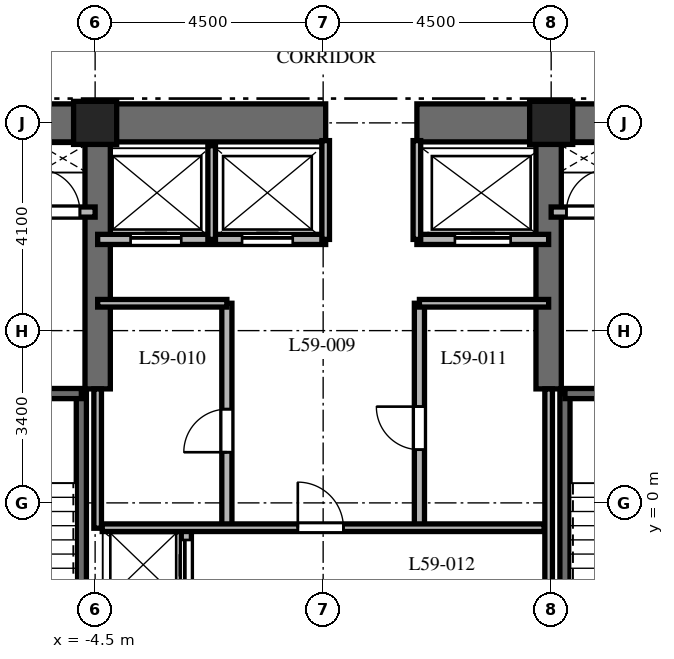
"""IFC4 building model, lengths in metres.
Left out: names, types, materials, properties, quantities, classifications, styles, units other than length and angle.
Written with IfcOpenShell. Run it as: python <this file> out.ifc"""

import sys

from ifc_helpers import new_model, si_unit, direction, frame, frame_2d, origin, origin_2d, place, context, subcontext, project, spatial, rectangle, extrude, element, fill, save


model = new_model("IFC4")
c1 = context("Model", 3, precision=1e-05, world=origin(), true_north=direction((0.0, 1.0)))
c2 = subcontext(c1, "Body", "Model", "MODEL_VIEW")
j1 = project(units=[si_unit("LENGTHUNIT", "METRE"), si_unit("PLANEANGLEUNIT", "RADIAN")], contexts=[c1])
p1 = place(None, origin())
s1 = spatial("IfcSite", under=j1, at=p1, CompositionType="ELEMENT")
p2 = place(p1, origin())
s2 = spatial("IfcBuilding", under=s1, at=p2, CompositionType="ELEMENT")
p3 = place(p2, frame((0.0, 0.0, 236.9)))
s3 = spatial("IfcBuildingStorey", under=s2, at=p3, CompositionType="ELEMENT", Elevation=236.9)
p4 = place(p3, frame((-9.375, 7.5, 0.0), z_axis=(0.0, 0.0, 1.0), x_axis=(1.0, 0.0, 0.0)))
e1 = element("IfcWall", 1, at=p4, inside=s3, PredefinedType="SHEAR", context=c2, shape_type="SweptSolid", body=[
    extrude(rectangle(XDim=9.425, YDim=0.75, at=frame_2d((4.712, 0.0))), origin(), (0.0, 0.0, 1.0), 3.8),
])
p5 = place(p3, frame((1.85, 7.5, 0.0), z_axis=(0.0, 0.0, 1.0), x_axis=(1.0, 0.0, 0.0)))
e2 = element("IfcWall", 2, at=p5, inside=s3, PredefinedType="SHEAR", context=c2, shape_type="SweptSolid", body=[
    extrude(rectangle(XDim=7.525, YDim=0.75, at=frame_2d((3.762, 0.0))), origin(), (0.0, 0.0, 1.0), 3.8),
])
for number, where, z_axis, x_axis in (
    (3, (-4.45, 2.25, 0.0), (0.0, 0.0, 1.0), (0.0, 1.0, 0.0)),
    (4, (4.45, 2.25, 0.0), (0.0, 0.0, 1.0), (0.0, 1.0, 0.0)),
):
    element("IfcWall", number, at=place(p3, frame(where, z_axis=z_axis, x_axis=x_axis)), inside=s3, PredefinedType="SHEAR", context=c2, shape_type="SweptSolid", body=[
        extrude(rectangle(XDim=4.875, YDim=0.5, at=frame_2d((2.438, 0.0))), origin(), (0.0, 0.0, 1.0), 3.8),
    ])
p6 = place(p3, frame((-4.772, -6.985, 0.0), z_axis=(0.0, 0.0, 1.0), x_axis=(0.0, 1.0, 0.0)))
e5 = element("IfcWall", 5, at=p6, inside=s3, PredefinedType="SHEAR", context=c2, shape_type="SweptSolid", body=[
    extrude(rectangle(XDim=9.143, YDim=0.2, at=frame_2d((4.572, 0.0))), origin(), (0.0, 0.0, 1.0), 3.8),
])
p7 = place(p3, frame((-8.458, 2.158, 0.0), z_axis=(0.0, 0.0, 1.0), x_axis=(1.0, 0.0, 0.0)))
e6 = element("IfcWall", 6, at=p7, inside=s3, PredefinedType="SHEAR", context=c2, shape_type="SweptSolid", body=[
    extrude(rectangle(XDim=3.686, YDim=0.2, at=frame_2d((1.843, 0.0))), origin(), (0.0, 0.0, 1.0), 3.8),
])
p8 = place(p7, frame((1.3, 0.0, 0.0)))
e7 = element("IfcOpeningElement", 7, at=p8, cuts=e6, PredefinedType="OPENING", context=c2, shape_type="SweptSolid", body=[
    extrude(rectangle(XDim=1.0, YDim=2.15, at=frame_2d((0.5, 1.075))), frame((0.0, 0.11, 0.0), z_axis=(0.0, -1.0, 0.0), x_axis=(1.0, 0.0, 0.0)), (0.0, 0.0, 1.0), 0.22),
])
p9 = place(p3, frame((4.772, -6.985, 0.0), z_axis=(0.0, 0.0, 1.0), x_axis=(0.0, 1.0, 0.0)))
e8 = element("IfcWall", 8, at=p9, inside=s3, PredefinedType="SHEAR", context=c2, shape_type="SweptSolid", body=[
    extrude(rectangle(XDim=9.143, YDim=0.2, at=frame_2d((4.572, 0.0))), origin(), (0.0, 0.0, 1.0), 3.8),
])
p10 = place(p3, frame((4.772, 2.158, 0.0), z_axis=(0.0, 0.0, 1.0), x_axis=(1.0, 0.0, 0.0)))
e9 = element("IfcWall", 9, at=p10, inside=s3, PredefinedType="SHEAR", context=c2, shape_type="SweptSolid", body=[
    extrude(rectangle(XDim=3.686, YDim=0.2, at=frame_2d((1.843, 0.0))), origin(), (0.0, 0.0, 1.0), 3.8),
])
p11 = place(p10, frame((1.35, 0.0, 0.0)))
e10 = element("IfcOpeningElement", 10, at=p11, cuts=e9, PredefinedType="OPENING", context=c2, shape_type="SweptSolid", body=[
    extrude(rectangle(XDim=1.0, YDim=2.15, at=frame_2d((0.5, 1.075))), frame((0.0, 0.11, 0.0), z_axis=(0.0, -1.0, 0.0), x_axis=(1.0, 0.0, 0.0)), (0.0, 0.0, 1.0), 0.22),
])
for number, where, z_axis, x_axis in (
    (11, (4.5, 7.5, 0.0), (0.0, 0.0, 1.0), (1.0, 0.0, 0.0)),
    (12, (-4.5, 7.5, 0.0), (0.0, 0.0, 1.0), (1.0, 0.0, 0.0)),
):
    element("IfcColumn", number, at=place(p3, frame(where, z_axis=z_axis, x_axis=x_axis)), inside=s3, PredefinedType="COLUMN", context=c2, shape_type="SweptSolid", body=[
        extrude(rectangle(XDim=0.85, YDim=0.85, at=origin_2d()), origin(), (0.0, 0.0, 1.0), 3.8),
    ])
p12 = place(p3, frame((-8.55, 5.74, 0.0), z_axis=(0.0, 0.0, 1.0), x_axis=(1.0, 0.0, 0.0)))
e13 = element("IfcWall", 13, at=p12, inside=s3, PredefinedType="PARTITIONING", context=c2, shape_type="SweptSolid", body=[
    extrude(rectangle(XDim=4.05, YDim=0.2, at=frame_2d((2.025, 0.0))), origin(), (0.0, 0.0, 1.0), 3.5),
])
p13 = place(p12, frame((0.75, 0.0, 0.0)))
e14 = element("IfcOpeningElement", 14, at=p13, cuts=e13, PredefinedType="OPENING", context=c2, shape_type="SweptSolid", body=[
    extrude(rectangle(XDim=1.1, YDim=2.2, at=frame_2d((0.55, 1.1))), frame((0.0, 0.11, 0.0), z_axis=(0.0, -1.0, 0.0), x_axis=(1.0, 0.0, 0.0)), (0.0, 0.0, 1.0), 0.22),
])
p14 = place(p12, frame((2.9, 0.0, 0.0)))
e15 = element("IfcOpeningElement", 15, at=p14, cuts=e13, PredefinedType="OPENING", context=c2, shape_type="SweptSolid", body=[
    extrude(rectangle(XDim=0.85, YDim=2.03, at=frame_2d((0.425, 1.015))), frame((0.0, 0.11, 0.0), z_axis=(0.0, -1.0, 0.0), x_axis=(1.0, 0.0, 0.0)), (0.0, 0.0, 1.0), 0.22),
])
p15 = place(p3, frame((4.5, 5.74, 0.0), z_axis=(0.0, 0.0, 1.0), x_axis=(1.0, 0.0, 0.0)))
e16 = element("IfcWall", 16, at=p15, inside=s3, PredefinedType="PARTITIONING", context=c2, shape_type="SweptSolid", body=[
    extrude(rectangle(XDim=4.05, YDim=0.2, at=frame_2d((2.025, 0.0))), origin(), (0.0, 0.0, 1.0), 3.5),
])
p16 = place(p15, frame((0.3, 0.0, 0.0)))
e17 = element("IfcOpeningElement", 17, at=p16, cuts=e16, PredefinedType="OPENING", context=c2, shape_type="SweptSolid", body=[
    extrude(rectangle(XDim=0.85, YDim=2.03, at=frame_2d((0.425, 1.015))), frame((0.0, 0.11, 0.0), z_axis=(0.0, -1.0, 0.0), x_axis=(1.0, 0.0, 0.0)), (0.0, 0.0, 1.0), 0.22),
])
p17 = place(p15, frame((2.15, 0.0, 0.0)))
e18 = element("IfcOpeningElement", 18, at=p17, cuts=e16, PredefinedType="OPENING", context=c2, shape_type="SweptSolid", body=[
    extrude(rectangle(XDim=1.1, YDim=2.2, at=frame_2d((0.55, 1.1))), frame((0.0, 0.11, 0.0), z_axis=(0.0, -1.0, 0.0), x_axis=(1.0, 0.0, 0.0)), (0.0, 0.0, 1.0), 0.22),
])
p18 = place(p3, frame((-2.7, -1.972, 0.0), z_axis=(0.0, 0.0, 1.0), x_axis=(0.0, 1.0, 0.0)))
e19 = element("IfcWall", 19, at=p18, inside=s3, PredefinedType="PARTITIONING", context=c2, shape_type="SweptSolid", body=[
    extrude(rectangle(XDim=1.472, YDim=0.2, at=frame_2d((0.736, 0.0))), origin(), (0.0, 0.0, 1.0), 3.5),
])
p19 = place(p18, frame((0.24, 0.0, 0.0)))
e20 = element("IfcOpeningElement", 20, at=p19, cuts=e19, PredefinedType="OPENING", context=c2, shape_type="SweptSolid", body=[
    extrude(rectangle(XDim=1.0, YDim=2.2, at=frame_2d((0.5, 1.1))), frame((0.0, 0.11, 0.0), z_axis=(0.0, -1.0, 0.0), x_axis=(1.0, 0.0, 0.0)), (0.0, 0.0, 1.0), 0.22),
])
p20 = place(p3, frame((-4.45, 5.2, 0.0), z_axis=(0.0, 0.0, 1.0), x_axis=(1.0, 0.0, 0.0)))
e21 = element("IfcWall", 21, at=p20, inside=s3, PredefinedType="PARTITIONING", context=c2, shape_type="SweptSolid", body=[
    extrude(rectangle(XDim=4.5, YDim=0.2, at=frame_2d((2.25, 0.0))), origin(), (0.0, 0.0, 1.0), 3.5),
])
p21 = place(p20, frame((0.65, 0.0, 0.0)))
e22 = element("IfcOpeningElement", 22, at=p21, cuts=e21, PredefinedType="OPENING", context=c2, shape_type="SweptSolid", body=[
    extrude(rectangle(XDim=1.0, YDim=2.2, at=frame_2d((0.5, 1.1))), frame((0.0, 0.11, 0.0), z_axis=(0.0, -1.0, 0.0), x_axis=(1.0, 0.0, 0.0)), (0.0, 0.0, 1.0), 0.22),
])
p22 = place(p20, frame((2.85, 0.0, 0.0)))
e23 = element("IfcOpeningElement", 23, at=p22, cuts=e21, PredefinedType="OPENING", context=c2, shape_type="SweptSolid", body=[
    extrude(rectangle(XDim=1.0, YDim=2.2, at=frame_2d((0.5, 1.1))), frame((0.0, 0.11, 0.0), z_axis=(0.0, -1.0, 0.0), x_axis=(1.0, 0.0, 0.0)), (0.0, 0.0, 1.0), 0.22),
])
p23 = place(p3, frame((1.85, 5.2, 0.0), z_axis=(0.0, 0.0, 1.0), x_axis=(1.0, 0.0, 0.0)))
e24 = element("IfcWall", 24, at=p23, inside=s3, PredefinedType="PARTITIONING", context=c2, shape_type="SweptSolid", body=[
    extrude(rectangle(XDim=2.6, YDim=0.2, at=frame_2d((1.3, 0.0))), origin(), (0.0, 0.0, 1.0), 3.5),
])
p24 = place(p23, frame((0.75, 0.0, 0.0)))
e25 = element("IfcOpeningElement", 25, at=p24, cuts=e24, PredefinedType="OPENING", context=c2, shape_type="SweptSolid", body=[
    extrude(rectangle(XDim=1.1, YDim=2.2, at=frame_2d((0.55, 1.1))), frame((0.0, 0.11, 0.0), z_axis=(0.0, -1.0, 0.0), x_axis=(1.0, 0.0, 0.0)), (0.0, 0.0, 1.0), 0.22),
])
p25 = place(p3, frame((-2.2, 5.2, 0.0), z_axis=(0.0, 0.0, 1.0), x_axis=(0.0, 1.0, 0.0)))
e26 = element("IfcWall", 26, at=p25, inside=s3, PredefinedType="PARTITIONING", context=c2, shape_type="SweptSolid", body=[
    extrude(rectangle(XDim=1.85, YDim=0.15, at=frame_2d((0.925, 0.0))), origin(), (0.0, 0.0, 1.0), 3.5),
])
for number, where, z_axis, x_axis in (
    (27, (0.05, 5.2, 0.0), (0.0, 0.0, 1.0), (0.0, 1.0, 0.0)),
    (28, (1.85, 5.2, 0.0), (0.0, 0.0, 1.0), (0.0, 1.0, 0.0)),
):
    element("IfcWall", number, at=place(p3, frame(where, z_axis=z_axis, x_axis=x_axis)), inside=s3, PredefinedType="PARTITIONING", context=c2, shape_type="SweptSolid", body=[
        extrude(rectangle(XDim=1.95, YDim=0.15, at=frame_2d((0.975, 0.0))), origin(), (0.0, 0.0, 1.0), 3.5),
    ])
p26 = place(p3, frame((-4.45, -0.5, 0.0), z_axis=(0.0, 0.0, 1.0), x_axis=(0.0, 1.0, 0.0)))
e29 = element("IfcWall", 29, at=p26, inside=s3, PredefinedType="PARTITIONING", context=c2, shape_type="SweptSolid", body=[
    extrude(rectangle(XDim=2.75, YDim=0.15, at=frame_2d((1.375, 0.0))), origin(), (0.0, 0.0, 1.0), 3.5),
])
p27 = place(p3, frame((4.45, -1.972, 0.0), z_axis=(0.0, 0.0, 1.0), x_axis=(0.0, 1.0, 0.0)))
e30 = element("IfcWall", 30, at=p27, inside=s3, PredefinedType="PARTITIONING", context=c2, shape_type="SweptSolid", body=[
    extrude(rectangle(XDim=4.222, YDim=0.15, at=frame_2d((2.111, 0.0))), origin(), (0.0, 0.0, 1.0), 3.5),
])
p28 = place(p3, frame((-1.9, -0.5, 0.0), z_axis=(0.0, 0.0, 1.0), x_axis=(0.0, 1.0, 0.0)))
e31 = element("IfcWall", 31, at=p28, inside=s3, PredefinedType="PARTITIONING", context=c2, shape_type="SweptSolid", body=[
    extrude(rectangle(XDim=4.44, YDim=0.2, at=frame_2d((2.22, 0.0))), origin(), (0.0, 0.0, 1.0), 3.5),
])
p29 = place(p28, frame((1.5, 0.0, 0.0)))
e32 = element("IfcOpeningElement", 32, at=p29, cuts=e31, PredefinedType="OPENING", context=c2, shape_type="SweptSolid", body=[
    extrude(rectangle(XDim=0.85, YDim=2.03, at=frame_2d((0.425, 1.015))), frame((0.0, 0.11, 0.0), z_axis=(0.0, -1.0, 0.0), x_axis=(1.0, 0.0, 0.0)), (0.0, 0.0, 1.0), 0.22),
])
p30 = place(p3, frame((-4.45, 3.94, 0.0), z_axis=(0.0, 0.0, 1.0), x_axis=(1.0, 0.0, 0.0)))
e33 = element("IfcWall", 33, at=p30, inside=s3, PredefinedType="PARTITIONING", context=c2, shape_type="SweptSolid", body=[
    extrude(rectangle(XDim=2.55, YDim=0.15, at=frame_2d((1.275, 0.0))), origin(), (0.0, 0.0, 1.0), 3.5),
])
p31 = place(p3, frame((1.9, -0.5, 0.0), z_axis=(0.0, 0.0, 1.0), x_axis=(0.0, 1.0, 0.0)))
e34 = element("IfcWall", 34, at=p31, inside=s3, PredefinedType="PARTITIONING", context=c2, shape_type="SweptSolid", body=[
    extrude(rectangle(XDim=4.44, YDim=0.2, at=frame_2d((2.22, 0.0))), origin(), (0.0, 0.0, 1.0), 3.5),
])
p32 = place(p31, frame((1.55, 0.0, 0.0)))
e35 = element("IfcOpeningElement", 35, at=p32, cuts=e34, PredefinedType="OPENING", context=c2, shape_type="SweptSolid", body=[
    extrude(rectangle(XDim=0.85, YDim=2.03, at=frame_2d((0.425, 1.015))), frame((0.0, 0.11, 0.0), z_axis=(0.0, -1.0, 0.0), x_axis=(1.0, 0.0, 0.0)), (0.0, 0.0, 1.0), 0.22),
])
p33 = place(p3, frame((1.9, 3.94, 0.0), z_axis=(0.0, 0.0, 1.0), x_axis=(1.0, 0.0, 0.0)))
e36 = element("IfcWall", 36, at=p33, inside=s3, PredefinedType="PARTITIONING", context=c2, shape_type="SweptSolid", body=[
    extrude(rectangle(XDim=2.55, YDim=0.15, at=frame_2d((1.275, 0.0))), origin(), (0.0, 0.0, 1.0), 3.5),
])
p34 = place(p3, frame((-4.36, -0.49, 0.0), z_axis=(0.0, 0.0, 1.0), x_axis=(1.0, 0.0, 0.0)))
e37 = element("IfcWall", 37, at=p34, inside=s3, PredefinedType="PARTITIONING", context=c2, shape_type="SweptSolid", body=[
    extrude(rectangle(XDim=8.72, YDim=0.15, at=frame_2d((4.36, 0.0))), origin(), (0.0, 0.0, 1.0), 3.5),
])
p35 = place(p34, frame((3.86, 0.0, 0.0)))
e38 = element("IfcOpeningElement", 38, at=p35, cuts=e37, PredefinedType="OPENING", context=c2, shape_type="SweptSolid", body=[
    extrude(rectangle(XDim=0.9, YDim=2.03, at=frame_2d((0.45, 1.015))), frame((0.0, 0.085, 0.0), z_axis=(0.0, -1.0, 0.0), x_axis=(1.0, 0.0, 0.0)), (0.0, 0.0, 1.0), 0.17),
])
p36 = place(p14, origin())
e39 = element("IfcDoor", 39, at=p36, inside=s3, OperationType="SINGLE_SWING_LEFT", PredefinedType="DOOR", context=c2, shape_type="SweptSolid", body=[
    extrude(rectangle(XDim=0.85, YDim=2.03, at=frame_2d((0.425, 1.015))), frame((0.0, 0.025, 0.0), z_axis=(0.0, -1.0, 0.0), x_axis=(1.0, 0.0, 0.0)), (0.0, 0.0, 1.0), 0.05),
])
fill(e15, e39)
p37 = place(p16, origin())
e40 = element("IfcDoor", 40, at=p37, inside=s3, OperationType="SINGLE_SWING_RIGHT", PredefinedType="DOOR", context=c2, shape_type="SweptSolid", body=[
    extrude(rectangle(XDim=0.85, YDim=2.03, at=frame_2d((0.425, 1.015))), frame((0.0, 0.025, 0.0), z_axis=(0.0, -1.0, 0.0), x_axis=(1.0, 0.0, 0.0)), (0.0, 0.0, 1.0), 0.05),
])
fill(e17, e40)
p38 = place(p19, origin())
e41 = element("IfcDoor", 41, at=p38, inside=s3, OperationType="SLIDING_TO_LEFT", PredefinedType="DOOR", context=c2, shape_type="SweptSolid", body=[
    extrude(rectangle(XDim=1.0, YDim=2.2, at=frame_2d((0.5, 1.1))), frame((0.0, 0.025, 0.0), z_axis=(0.0, -1.0, 0.0), x_axis=(1.0, 0.0, 0.0)), (0.0, 0.0, 1.0), 0.05),
])
fill(e20, e41)
p39 = place(p21, origin())
e42 = element("IfcDoor", 42, at=p39, inside=s3, OperationType="SLIDING_TO_LEFT", PredefinedType="DOOR", context=c2, shape_type="SweptSolid", body=[
    extrude(rectangle(XDim=1.0, YDim=2.2, at=frame_2d((0.5, 1.1))), frame((0.0, 0.025, 0.0), z_axis=(0.0, -1.0, 0.0), x_axis=(1.0, 0.0, 0.0)), (0.0, 0.0, 1.0), 0.05),
])
fill(e22, e42)
p40 = place(p22, origin())
e43 = element("IfcDoor", 43, at=p40, inside=s3, OperationType="SLIDING_TO_RIGHT", PredefinedType="DOOR", context=c2, shape_type="SweptSolid", body=[
    extrude(rectangle(XDim=1.0, YDim=2.2, at=frame_2d((0.5, 1.1))), frame((0.0, 0.025, 0.0), z_axis=(0.0, -1.0, 0.0), x_axis=(1.0, 0.0, 0.0)), (0.0, 0.0, 1.0), 0.05),
])
fill(e23, e43)
p41 = place(p24, origin())
e44 = element("IfcDoor", 44, at=p41, inside=s3, OperationType="SLIDING_TO_RIGHT", PredefinedType="DOOR", context=c2, shape_type="SweptSolid", body=[
    extrude(rectangle(XDim=1.1, YDim=2.2, at=frame_2d((0.55, 1.1))), frame((0.0, 0.025, 0.0), z_axis=(0.0, -1.0, 0.0), x_axis=(1.0, 0.0, 0.0)), (0.0, 0.0, 1.0), 0.05),
])
fill(e25, e44)
p42 = place(p29, origin())
e45 = element("IfcDoor", 45, at=p42, inside=s3, OperationType="SINGLE_SWING_LEFT", PredefinedType="DOOR", context=c2, shape_type="SweptSolid", body=[
    extrude(rectangle(XDim=0.85, YDim=2.03, at=frame_2d((0.425, 1.015))), frame((0.0, 0.025, 0.0), z_axis=(0.0, -1.0, 0.0), x_axis=(1.0, 0.0, 0.0)), (0.0, 0.0, 1.0), 0.05),
])
fill(e32, e45)
p43 = place(p32, origin())
e46 = element("IfcDoor", 46, at=p43, inside=s3, OperationType="SINGLE_SWING_RIGHT", PredefinedType="DOOR", context=c2, shape_type="SweptSolid", body=[
    extrude(rectangle(XDim=0.85, YDim=2.03, at=frame_2d((0.425, 1.015))), frame((0.0, 0.025, 0.0), z_axis=(0.0, -1.0, 0.0), x_axis=(1.0, 0.0, 0.0)), (0.0, 0.0, 1.0), 0.05),
])
fill(e35, e46)
p44 = place(p35, origin())
e47 = element("IfcDoor", 47, at=p44, inside=s3, OperationType="SINGLE_SWING_LEFT", PredefinedType="DOOR", context=c2, shape_type="SweptSolid", body=[
    extrude(rectangle(XDim=0.9, YDim=2.03, at=frame_2d((0.45, 1.015))), frame((0.0, 0.025, 0.0), z_axis=(0.0, -1.0, 0.0), x_axis=(1.0, 0.0, 0.0)), (0.0, 0.0, 1.0), 0.05),
])
fill(e38, e47)
save(model, sys.argv[1])
